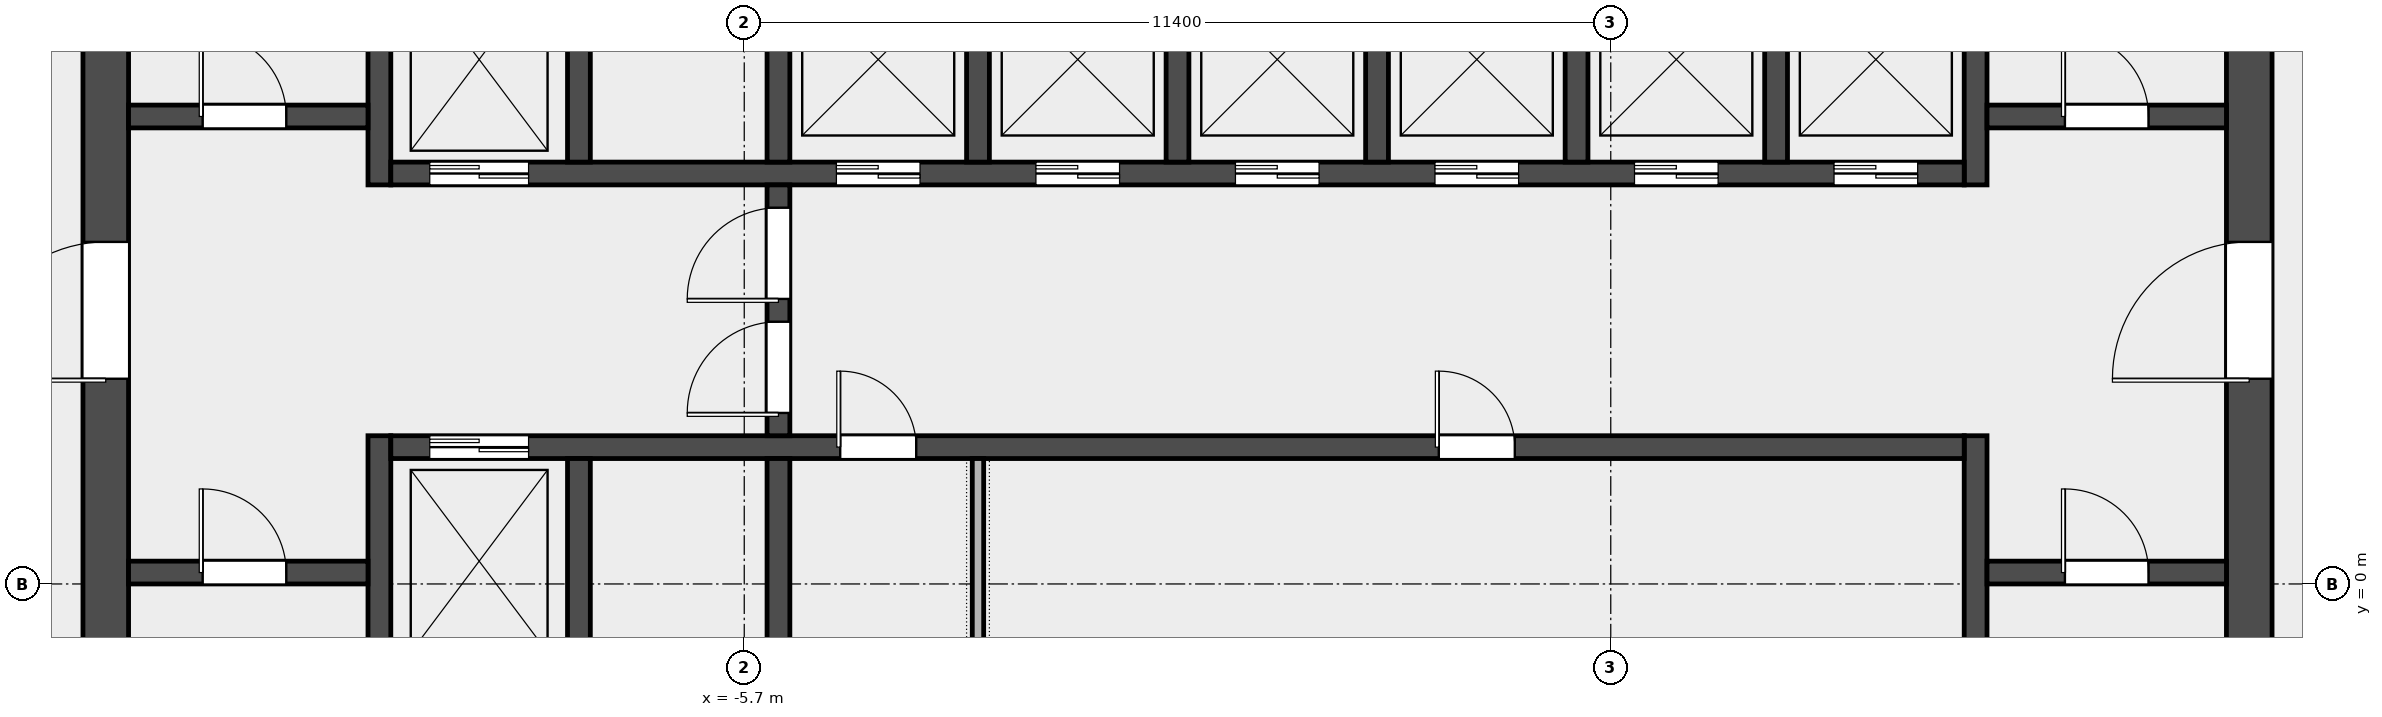
"""IFC4 building model, lengths in metres.
Left out: names, types, materials, properties, quantities, classifications, styles, units other than length and angle.
Written with IfcOpenShell. Run it as: python <this file> out.ifc"""

import sys

from ifc_helpers import new_model, si_unit, direction, frame, frame_2d, origin, place, context, subcontext, project, spatial, rectangle, extrude, element, fill, save


model = new_model("IFC4")
c1 = context("Model", 3, precision=1e-05, world=origin(), true_north=direction((0.0, 1.0)))
c2 = subcontext(c1, "Body", "Model", "MODEL_VIEW")
j1 = project(units=[si_unit("LENGTHUNIT", "METRE"), si_unit("PLANEANGLEUNIT", "RADIAN")], contexts=[c1])
p1 = place(None, origin())
s1 = spatial("IfcSite", under=j1, at=p1, CompositionType="ELEMENT")
p2 = place(p1, origin())
s2 = spatial("IfcBuilding", under=s1, at=p2, CompositionType="ELEMENT")
p3 = place(p2, frame((0.0, 0.0, 321.4)))
s3 = spatial("IfcBuildingStorey", under=s2, at=p3, CompositionType="ELEMENT", Elevation=321.4)
p4 = place(p3, frame((-14.1, -6.6, 0.0), z_axis=(0.0, 0.0, 1.0), x_axis=(0.0, 1.0, 0.0)))
e1 = element("IfcWall", 1, at=p4, inside=s3, PredefinedType="SHEAR", context=c2, shape_type="SweptSolid", body=[
    extrude(rectangle(XDim=19.5, YDim=0.6, at=frame_2d((9.75, 0.0))), origin(), (0.0, 0.0, 1.0), 3.7),
])
p5 = place(p4, frame((9.3, 0.0, 0.0)))
e2 = element("IfcOpeningElement", 2, at=p5, cuts=e1, PredefinedType="OPENING", context=c2, shape_type="SweptSolid", body=[
    extrude(rectangle(XDim=1.8, YDim=2.1, at=frame_2d((0.9, 1.05))), frame((0.0, 0.312, 0.0), z_axis=(0.0, -1.0, 0.0), x_axis=(1.0, 0.0, 0.0)), (0.0, 0.0, 1.0), 0.624),
])
p6 = place(p3, frame((14.1, -6.6, 0.0), z_axis=(0.0, 0.0, 1.0), x_axis=(0.0, 1.0, 0.0)))
e3 = element("IfcWall", 3, at=p6, inside=s3, PredefinedType="SHEAR", context=c2, shape_type="SweptSolid", body=[
    extrude(rectangle(XDim=19.5, YDim=0.6, at=frame_2d((9.75, 0.0))), origin(), (0.0, 0.0, 1.0), 3.7),
])
p7 = place(p6, frame((9.3, 0.0, 0.0)))
e4 = element("IfcOpeningElement", 4, at=p7, cuts=e3, PredefinedType="OPENING", context=c2, shape_type="SweptSolid", body=[
    extrude(rectangle(XDim=1.8, YDim=2.1, at=frame_2d((0.9, 1.05))), frame((0.0, 0.312, 0.0), z_axis=(0.0, -1.0, 0.0), x_axis=(1.0, 0.0, 0.0)), (0.0, 0.0, 1.0), 0.624),
])
p8 = place(p3, frame((-10.5, -6.6, 0.0), z_axis=(0.0, 0.0, 1.0), x_axis=(0.0, 1.0, 0.0)))
e5 = element("IfcWall", 5, at=p8, inside=s3, PredefinedType="SHEAR", context=c2, shape_type="SweptSolid", body=[
    extrude(rectangle(XDim=8.55, YDim=0.3, at=frame_2d((4.275, 0.0))), origin(), (0.0, 0.0, 1.0), 3.7),
])
p9 = place(p3, frame((-10.5, 5.25, 0.0), z_axis=(0.0, 0.0, 1.0), x_axis=(0.0, 1.0, 0.0)))
e6 = element("IfcWall", 6, at=p9, inside=s3, PredefinedType="SHEAR", context=c2, shape_type="SweptSolid", body=[
    extrude(rectangle(XDim=7.65, YDim=0.3, at=frame_2d((3.825, 0.0))), origin(), (0.0, 0.0, 1.0), 3.7),
])
p10 = place(p3, frame((10.5, -6.6, 0.0), z_axis=(0.0, 0.0, 1.0), x_axis=(0.0, 1.0, 0.0)))
e7 = element("IfcWall", 7, at=p10, inside=s3, PredefinedType="SHEAR", context=c2, shape_type="SweptSolid", body=[
    extrude(rectangle(XDim=8.55, YDim=0.3, at=frame_2d((4.275, 0.0))), origin(), (0.0, 0.0, 1.0), 3.7),
])
p11 = place(p3, frame((10.5, 5.25, 0.0), z_axis=(0.0, 0.0, 1.0), x_axis=(0.0, 1.0, 0.0)))
e8 = element("IfcWall", 8, at=p11, inside=s3, PredefinedType="SHEAR", context=c2, shape_type="SweptSolid", body=[
    extrude(rectangle(XDim=7.65, YDim=0.3, at=frame_2d((3.825, 0.0))), origin(), (0.0, 0.0, 1.0), 3.7),
])
p12 = place(p3, frame((-13.8, 0.15, 0.0), z_axis=(0.0, 0.0, 1.0), x_axis=(1.0, 0.0, 0.0)))
e9 = element("IfcWall", 9, at=p12, inside=s3, PredefinedType="SOLIDWALL", context=c2, shape_type="SweptSolid", body=[
    extrude(rectangle(XDim=3.15, YDim=0.3, at=frame_2d((1.575, 0.0))), origin(), (0.0, 0.0, 1.0), 3.7),
])
p13 = place(p12, frame((0.975, 0.0, 0.0)))
e10 = element("IfcOpeningElement", 10, at=p13, cuts=e9, PredefinedType="OPENING", context=c2, shape_type="SweptSolid", body=[
    extrude(rectangle(XDim=1.1, YDim=2.1, at=frame_2d((0.55, 1.05))), frame((0.0, 0.162, 0.0), z_axis=(0.0, -1.0, 0.0), x_axis=(1.0, 0.0, 0.0)), (0.0, 0.0, 1.0), 0.324),
])
p14 = place(p3, frame((-13.8, 6.15, 0.0), z_axis=(0.0, 0.0, 1.0), x_axis=(1.0, 0.0, 0.0)))
e11 = element("IfcWall", 11, at=p14, inside=s3, PredefinedType="SOLIDWALL", context=c2, shape_type="SweptSolid", body=[
    extrude(rectangle(XDim=3.15, YDim=0.3, at=frame_2d((1.575, 0.0))), origin(), (0.0, 0.0, 1.0), 3.7),
])
p15 = place(p14, frame((0.975, 0.0, 0.0)))
e12 = element("IfcOpeningElement", 12, at=p15, cuts=e11, PredefinedType="OPENING", context=c2, shape_type="SweptSolid", body=[
    extrude(rectangle(XDim=1.1, YDim=2.1, at=frame_2d((0.55, 1.05))), frame((0.0, 0.162, 0.0), z_axis=(0.0, -1.0, 0.0), x_axis=(1.0, 0.0, 0.0)), (0.0, 0.0, 1.0), 0.324),
])
p16 = place(p3, frame((10.65, 0.15, 0.0), z_axis=(0.0, 0.0, 1.0), x_axis=(1.0, 0.0, 0.0)))
e13 = element("IfcWall", 13, at=p16, inside=s3, PredefinedType="SOLIDWALL", context=c2, shape_type="SweptSolid", body=[
    extrude(rectangle(XDim=3.15, YDim=0.3, at=frame_2d((1.575, 0.0))), origin(), (0.0, 0.0, 1.0), 3.7),
])
p17 = place(p16, frame((1.025, 0.0, 0.0)))
e14 = element("IfcOpeningElement", 14, at=p17, cuts=e13, PredefinedType="OPENING", context=c2, shape_type="SweptSolid", body=[
    extrude(rectangle(XDim=1.1, YDim=2.1, at=frame_2d((0.55, 1.05))), frame((0.0, 0.162, 0.0), z_axis=(0.0, -1.0, 0.0), x_axis=(1.0, 0.0, 0.0)), (0.0, 0.0, 1.0), 0.324),
])
p18 = place(p3, frame((10.65, 6.15, 0.0), z_axis=(0.0, 0.0, 1.0), x_axis=(1.0, 0.0, 0.0)))
e15 = element("IfcWall", 15, at=p18, inside=s3, PredefinedType="SOLIDWALL", context=c2, shape_type="SweptSolid", body=[
    extrude(rectangle(XDim=3.15, YDim=0.3, at=frame_2d((1.575, 0.0))), origin(), (0.0, 0.0, 1.0), 3.7),
])
p19 = place(p18, frame((1.025, 0.0, 0.0)))
e16 = element("IfcOpeningElement", 16, at=p19, cuts=e15, PredefinedType="OPENING", context=c2, shape_type="SweptSolid", body=[
    extrude(rectangle(XDim=1.1, YDim=2.1, at=frame_2d((0.55, 1.05))), frame((0.0, 0.162, 0.0), z_axis=(0.0, -1.0, 0.0), x_axis=(1.0, 0.0, 0.0)), (0.0, 0.0, 1.0), 0.324),
])
p20 = place(p3, frame((-10.35, 1.8, 0.0), z_axis=(0.0, 0.0, 1.0), x_axis=(1.0, 0.0, 0.0)))
e17 = element("IfcWall", 17, at=p20, inside=s3, PredefinedType="SOLIDWALL", context=c2, shape_type="SweptSolid", body=[
    extrude(rectangle(XDim=20.7, YDim=0.3, at=frame_2d((10.35, 0.0))), origin(), (0.0, 0.0, 1.0), 3.7),
])
p21 = place(p20, frame((0.512, 0.0, 0.0)))
e18 = element("IfcOpeningElement", 18, at=p21, cuts=e17, PredefinedType="OPENING", context=c2, shape_type="SweptSolid", body=[
    extrude(rectangle(XDim=1.3, YDim=2.1, at=frame_2d((0.65, 1.05))), frame((0.0, 0.162, 0.0), z_axis=(0.0, -1.0, 0.0), x_axis=(1.0, 0.0, 0.0)), (0.0, 0.0, 1.0), 0.324),
])
p22 = place(p20, frame((5.913, 0.0, 0.0)))
e19 = element("IfcOpeningElement", 19, at=p22, cuts=e17, PredefinedType="OPENING", context=c2, shape_type="SweptSolid", body=[
    extrude(rectangle(XDim=1.0, YDim=2.1, at=frame_2d((0.5, 1.05))), frame((0.0, 0.162, 0.0), z_axis=(0.0, -1.0, 0.0), x_axis=(1.0, 0.0, 0.0)), (0.0, 0.0, 1.0), 0.324),
])
p23 = place(p20, frame((13.788, 0.0, 0.0)))
e20 = element("IfcOpeningElement", 20, at=p23, cuts=e17, PredefinedType="OPENING", context=c2, shape_type="SweptSolid", body=[
    extrude(rectangle(XDim=1.0, YDim=2.1, at=frame_2d((0.5, 1.05))), frame((0.0, 0.162, 0.0), z_axis=(0.0, -1.0, 0.0), x_axis=(1.0, 0.0, 0.0)), (0.0, 0.0, 1.0), 0.324),
])
p24 = place(p3, frame((-10.35, 5.4, 0.0), z_axis=(0.0, 0.0, 1.0), x_axis=(1.0, 0.0, 0.0)))
e21 = element("IfcWall", 21, at=p24, inside=s3, PredefinedType="SOLIDWALL", context=c2, shape_type="SweptSolid", body=[
    extrude(rectangle(XDim=20.7, YDim=0.3, at=frame_2d((10.35, 0.0))), origin(), (0.0, 0.0, 1.0), 3.7),
])
p25 = place(p24, frame((0.512, 0.0, 0.0)))
e22 = element("IfcOpeningElement", 22, at=p25, cuts=e21, PredefinedType="OPENING", context=c2, shape_type="SweptSolid", body=[
    extrude(rectangle(XDim=1.3, YDim=2.1, at=frame_2d((0.65, 1.05))), frame((0.0, 0.162, 0.0), z_axis=(0.0, -1.0, 0.0), x_axis=(1.0, 0.0, 0.0)), (0.0, 0.0, 1.0), 0.324),
])
p26 = place(p24, frame((5.863, 0.0, 0.0)))
e23 = element("IfcOpeningElement", 23, at=p26, cuts=e21, PredefinedType="OPENING", context=c2, shape_type="SweptSolid", body=[
    extrude(rectangle(XDim=1.1, YDim=2.1, at=frame_2d((0.55, 1.05))), frame((0.0, 0.162, 0.0), z_axis=(0.0, -1.0, 0.0), x_axis=(1.0, 0.0, 0.0)), (0.0, 0.0, 1.0), 0.324),
])
p27 = place(p24, frame((8.488, 0.0, 0.0)))
e24 = element("IfcOpeningElement", 24, at=p27, cuts=e21, PredefinedType="OPENING", context=c2, shape_type="SweptSolid", body=[
    extrude(rectangle(XDim=1.1, YDim=2.1, at=frame_2d((0.55, 1.05))), frame((0.0, 0.162, 0.0), z_axis=(0.0, -1.0, 0.0), x_axis=(1.0, 0.0, 0.0)), (0.0, 0.0, 1.0), 0.324),
])
p28 = place(p24, frame((11.113, 0.0, 0.0)))
e25 = element("IfcOpeningElement", 25, at=p28, cuts=e21, PredefinedType="OPENING", context=c2, shape_type="SweptSolid", body=[
    extrude(rectangle(XDim=1.1, YDim=2.1, at=frame_2d((0.55, 1.05))), frame((0.0, 0.162, 0.0), z_axis=(0.0, -1.0, 0.0), x_axis=(1.0, 0.0, 0.0)), (0.0, 0.0, 1.0), 0.324),
])
p29 = place(p24, frame((13.738, 0.0, 0.0)))
e26 = element("IfcOpeningElement", 26, at=p29, cuts=e21, PredefinedType="OPENING", context=c2, shape_type="SweptSolid", body=[
    extrude(rectangle(XDim=1.1, YDim=2.1, at=frame_2d((0.55, 1.05))), frame((0.0, 0.162, 0.0), z_axis=(0.0, -1.0, 0.0), x_axis=(1.0, 0.0, 0.0)), (0.0, 0.0, 1.0), 0.324),
])
p30 = place(p24, frame((16.363, 0.0, 0.0)))
e27 = element("IfcOpeningElement", 27, at=p30, cuts=e21, PredefinedType="OPENING", context=c2, shape_type="SweptSolid", body=[
    extrude(rectangle(XDim=1.1, YDim=2.1, at=frame_2d((0.55, 1.05))), frame((0.0, 0.162, 0.0), z_axis=(0.0, -1.0, 0.0), x_axis=(1.0, 0.0, 0.0)), (0.0, 0.0, 1.0), 0.324),
])
p31 = place(p24, frame((18.988, 0.0, 0.0)))
e28 = element("IfcOpeningElement", 28, at=p31, cuts=e21, PredefinedType="OPENING", context=c2, shape_type="SweptSolid", body=[
    extrude(rectangle(XDim=1.1, YDim=2.1, at=frame_2d((0.55, 1.05))), frame((0.0, 0.162, 0.0), z_axis=(0.0, -1.0, 0.0), x_axis=(1.0, 0.0, 0.0)), (0.0, 0.0, 1.0), 0.324),
])
for number, where, z_axis, x_axis in (
    (29, (-7.875, -1.05, 0.0), (0.0, 0.0, 1.0), (0.0, 1.0, 0.0)),
    (30, (-5.25, -1.05, 0.0), (0.0, 0.0, 1.0), (0.0, 1.0, 0.0)),
    (31, (-7.875, 5.55, 0.0), (0.0, 0.0, 1.0), (0.0, 1.0, 0.0)),
    (32, (-5.25, 5.55, 0.0), (0.0, 0.0, 1.0), (0.0, 1.0, 0.0)),
    (33, (-2.625, 5.55, 0.0), (0.0, 0.0, 1.0), (0.0, 1.0, 0.0)),
    (34, (0.0, 5.55, 0.0), (0.0, 0.0, 1.0), (0.0, 1.0, 0.0)),
    (35, (2.625, 5.55, 0.0), (0.0, 0.0, 1.0), (0.0, 1.0, 0.0)),
    (36, (5.25, 5.55, 0.0), (0.0, 0.0, 1.0), (0.0, 1.0, 0.0)),
    (37, (7.875, 5.55, 0.0), (0.0, 0.0, 1.0), (0.0, 1.0, 0.0)),
):
    element("IfcWall", number, at=place(p3, frame(where, z_axis=z_axis, x_axis=x_axis)), inside=s3, PredefinedType="SOLIDWALL", context=c2, shape_type="SweptSolid", body=[
        extrude(rectangle(XDim=2.7, YDim=0.3, at=frame_2d((1.35, 0.0))), origin(), (0.0, 0.0, 1.0), 3.7),
    ])
p32 = place(p3, frame((-5.25, 1.95, 0.0), z_axis=(0.0, 0.0, 1.0), x_axis=(0.0, 1.0, 0.0)))
e38 = element("IfcWall", 38, at=p32, inside=s3, PredefinedType="SOLIDWALL", context=c2, shape_type="SweptSolid", body=[
    extrude(rectangle(XDim=3.3, YDim=0.3, at=frame_2d((1.65, 0.0))), origin(), (0.0, 0.0, 1.0), 3.7),
])
p33 = place(p32, frame((0.3, 0.0, 0.0)))
e39 = element("IfcOpeningElement", 39, at=p33, cuts=e38, PredefinedType="OPENING", context=c2, shape_type="SweptSolid", body=[
    extrude(rectangle(XDim=1.2, YDim=2.1, at=frame_2d((0.6, 1.05))), frame((0.0, 0.162, 0.0), z_axis=(0.0, -1.0, 0.0), x_axis=(1.0, 0.0, 0.0)), (0.0, 0.0, 1.0), 0.324),
])
p34 = place(p32, frame((1.8, 0.0, 0.0)))
e40 = element("IfcOpeningElement", 40, at=p34, cuts=e38, PredefinedType="OPENING", context=c2, shape_type="SweptSolid", body=[
    extrude(rectangle(XDim=1.2, YDim=2.1, at=frame_2d((0.6, 1.05))), frame((0.0, 0.162, 0.0), z_axis=(0.0, -1.0, 0.0), x_axis=(1.0, 0.0, 0.0)), (0.0, 0.0, 1.0), 0.324),
])
p35 = place(p3, frame((-2.625, -1.05, 0.0), z_axis=(0.0, 0.0, 1.0), x_axis=(0.0, 1.0, 0.0)))
e41 = element("IfcWall", 41, at=p35, inside=s3, PredefinedType="PARTITIONING", context=c2, shape_type="SweptSolid", body=[
    extrude(rectangle(XDim=2.7, YDim=0.15, at=frame_2d((1.35, 0.0))), origin(), (0.0, 0.0, 1.0), 3.7),
])
p36 = place(p13, origin())
e42 = element("IfcDoor", 42, at=p36, inside=s3, OperationType="SINGLE_SWING_LEFT", PredefinedType="DOOR", context=c2, shape_type="SweptSolid", body=[
    extrude(rectangle(XDim=1.1, YDim=2.1, at=frame_2d((0.55, 1.05))), frame((0.0, 0.025, 0.0), z_axis=(0.0, -1.0, 0.0), x_axis=(1.0, 0.0, 0.0)), (0.0, 0.0, 1.0), 0.05),
])
fill(e10, e42)
p37 = place(p15, origin())
e43 = element("IfcDoor", 43, at=p37, inside=s3, OperationType="SINGLE_SWING_LEFT", PredefinedType="DOOR", context=c2, shape_type="SweptSolid", body=[
    extrude(rectangle(XDim=1.1, YDim=2.1, at=frame_2d((0.55, 1.05))), frame((0.0, 0.025, 0.0), z_axis=(0.0, -1.0, 0.0), x_axis=(1.0, 0.0, 0.0)), (0.0, 0.0, 1.0), 0.05),
])
fill(e12, e43)
p38 = place(p17, origin())
e44 = element("IfcDoor", 44, at=p38, inside=s3, OperationType="SINGLE_SWING_RIGHT", PredefinedType="DOOR", context=c2, shape_type="SweptSolid", body=[
    extrude(rectangle(XDim=1.1, YDim=2.1, at=frame_2d((0.55, 1.05))), frame((0.0, 0.025, 0.0), z_axis=(0.0, -1.0, 0.0), x_axis=(1.0, 0.0, 0.0)), (0.0, 0.0, 1.0), 0.05),
])
fill(e14, e44)
p39 = place(p19, origin())
e45 = element("IfcDoor", 45, at=p39, inside=s3, OperationType="SINGLE_SWING_RIGHT", PredefinedType="DOOR", context=c2, shape_type="SweptSolid", body=[
    extrude(rectangle(XDim=1.1, YDim=2.1, at=frame_2d((0.55, 1.05))), frame((0.0, 0.025, 0.0), z_axis=(0.0, -1.0, 0.0), x_axis=(1.0, 0.0, 0.0)), (0.0, 0.0, 1.0), 0.05),
])
fill(e16, e45)
p40 = place(p5, origin())
e46 = element("IfcDoor", 46, at=p40, inside=s3, OperationType="DOUBLE_DOOR_SINGLE_SWING", PredefinedType="DOOR", context=c2, shape_type="SweptSolid", body=[
    extrude(rectangle(XDim=1.8, YDim=2.1, at=frame_2d((0.9, 1.05))), frame((0.0, 0.025, 0.0), z_axis=(0.0, -1.0, 0.0), x_axis=(1.0, 0.0, 0.0)), (0.0, 0.0, 1.0), 0.05),
])
fill(e2, e46)
p41 = place(p7, origin())
e47 = element("IfcDoor", 47, at=p41, inside=s3, OperationType="DOUBLE_DOOR_SINGLE_SWING", PredefinedType="DOOR", context=c2, shape_type="SweptSolid", body=[
    extrude(rectangle(XDim=1.8, YDim=2.1, at=frame_2d((0.9, 1.05))), frame((0.0, 0.025, 0.0), z_axis=(0.0, -1.0, 0.0), x_axis=(1.0, 0.0, 0.0)), (0.0, 0.0, 1.0), 0.05),
])
fill(e4, e47)
p42 = place(p33, origin())
e48 = element("IfcDoor", 48, at=p42, inside=s3, OperationType="SINGLE_SWING_LEFT", PredefinedType="DOOR", context=c2, shape_type="SweptSolid", body=[
    extrude(rectangle(XDim=1.2, YDim=2.1, at=frame_2d((0.6, 1.05))), frame((0.0, 0.025, 0.0), z_axis=(0.0, -1.0, 0.0), x_axis=(1.0, 0.0, 0.0)), (0.0, 0.0, 1.0), 0.05),
])
fill(e39, e48)
p43 = place(p34, origin())
e49 = element("IfcDoor", 49, at=p43, inside=s3, OperationType="SINGLE_SWING_RIGHT", PredefinedType="DOOR", context=c2, shape_type="SweptSolid", body=[
    extrude(rectangle(XDim=1.2, YDim=2.1, at=frame_2d((0.6, 1.05))), frame((0.0, 0.025, 0.0), z_axis=(0.0, -1.0, 0.0), x_axis=(1.0, 0.0, 0.0)), (0.0, 0.0, 1.0), 0.05),
])
fill(e40, e49)
p44 = place(p21, origin())
e50 = element("IfcDoor", 50, at=p44, inside=s3, OperationType="DOUBLE_DOOR_SLIDING", PredefinedType="DOOR", context=c2, shape_type="SweptSolid", body=[
    extrude(rectangle(XDim=1.3, YDim=2.1, at=frame_2d((0.65, 1.05))), frame((0.0, 0.025, 0.0), z_axis=(0.0, -1.0, 0.0), x_axis=(1.0, 0.0, 0.0)), (0.0, 0.0, 1.0), 0.05),
])
fill(e18, e50)
p45 = place(p25, origin())
e51 = element("IfcDoor", 51, at=p45, inside=s3, OperationType="DOUBLE_DOOR_SLIDING", PredefinedType="DOOR", context=c2, shape_type="SweptSolid", body=[
    extrude(rectangle(XDim=1.3, YDim=2.1, at=frame_2d((0.65, 1.05))), frame((0.0, 0.025, 0.0), z_axis=(0.0, -1.0, 0.0), x_axis=(1.0, 0.0, 0.0)), (0.0, 0.0, 1.0), 0.05),
])
fill(e22, e51)
p46 = place(p26, origin())
e52 = element("IfcDoor", 52, at=p46, inside=s3, OperationType="DOUBLE_DOOR_SLIDING", PredefinedType="DOOR", context=c2, shape_type="SweptSolid", body=[
    extrude(rectangle(XDim=1.1, YDim=2.1, at=frame_2d((0.55, 1.05))), frame((0.0, 0.025, 0.0), z_axis=(0.0, -1.0, 0.0), x_axis=(1.0, 0.0, 0.0)), (0.0, 0.0, 1.0), 0.05),
])
fill(e23, e52)
p47 = place(p27, origin())
e53 = element("IfcDoor", 53, at=p47, inside=s3, OperationType="DOUBLE_DOOR_SLIDING", PredefinedType="DOOR", context=c2, shape_type="SweptSolid", body=[
    extrude(rectangle(XDim=1.1, YDim=2.1, at=frame_2d((0.55, 1.05))), frame((0.0, 0.025, 0.0), z_axis=(0.0, -1.0, 0.0), x_axis=(1.0, 0.0, 0.0)), (0.0, 0.0, 1.0), 0.05),
])
fill(e24, e53)
p48 = place(p28, origin())
e54 = element("IfcDoor", 54, at=p48, inside=s3, OperationType="DOUBLE_DOOR_SLIDING", PredefinedType="DOOR", context=c2, shape_type="SweptSolid", body=[
    extrude(rectangle(XDim=1.1, YDim=2.1, at=frame_2d((0.55, 1.05))), frame((0.0, 0.025, 0.0), z_axis=(0.0, -1.0, 0.0), x_axis=(1.0, 0.0, 0.0)), (0.0, 0.0, 1.0), 0.05),
])
fill(e25, e54)
p49 = place(p29, origin())
e55 = element("IfcDoor", 55, at=p49, inside=s3, OperationType="DOUBLE_DOOR_SLIDING", PredefinedType="DOOR", context=c2, shape_type="SweptSolid", body=[
    extrude(rectangle(XDim=1.1, YDim=2.1, at=frame_2d((0.55, 1.05))), frame((0.0, 0.025, 0.0), z_axis=(0.0, -1.0, 0.0), x_axis=(1.0, 0.0, 0.0)), (0.0, 0.0, 1.0), 0.05),
])
fill(e26, e55)
p50 = place(p30, origin())
e56 = element("IfcDoor", 56, at=p50, inside=s3, OperationType="DOUBLE_DOOR_SLIDING", PredefinedType="DOOR", context=c2, shape_type="SweptSolid", body=[
    extrude(rectangle(XDim=1.1, YDim=2.1, at=frame_2d((0.55, 1.05))), frame((0.0, 0.025, 0.0), z_axis=(0.0, -1.0, 0.0), x_axis=(1.0, 0.0, 0.0)), (0.0, 0.0, 1.0), 0.05),
])
fill(e27, e56)
p51 = place(p31, origin())
e57 = element("IfcDoor", 57, at=p51, inside=s3, OperationType="DOUBLE_DOOR_SLIDING", PredefinedType="DOOR", context=c2, shape_type="SweptSolid", body=[
    extrude(rectangle(XDim=1.1, YDim=2.1, at=frame_2d((0.55, 1.05))), frame((0.0, 0.025, 0.0), z_axis=(0.0, -1.0, 0.0), x_axis=(1.0, 0.0, 0.0)), (0.0, 0.0, 1.0), 0.05),
])
fill(e28, e57)
p52 = place(p22, origin())
e58 = element("IfcDoor", 58, at=p52, inside=s3, OperationType="SINGLE_SWING_LEFT", PredefinedType="DOOR", context=c2, shape_type="SweptSolid", body=[
    extrude(rectangle(XDim=1.0, YDim=2.1, at=frame_2d((0.5, 1.05))), frame((0.0, 0.025, 0.0), z_axis=(0.0, -1.0, 0.0), x_axis=(1.0, 0.0, 0.0)), (0.0, 0.0, 1.0), 0.05),
])
fill(e19, e58)
p53 = place(p23, origin())
e59 = element("IfcDoor", 59, at=p53, inside=s3, OperationType="SINGLE_SWING_LEFT", PredefinedType="DOOR", context=c2, shape_type="SweptSolid", body=[
    extrude(rectangle(XDim=1.0, YDim=2.1, at=frame_2d((0.5, 1.05))), frame((0.0, 0.025, 0.0), z_axis=(0.0, -1.0, 0.0), x_axis=(1.0, 0.0, 0.0)), (0.0, 0.0, 1.0), 0.05),
])
fill(e20, e59)
save(model, sys.argv[1])
